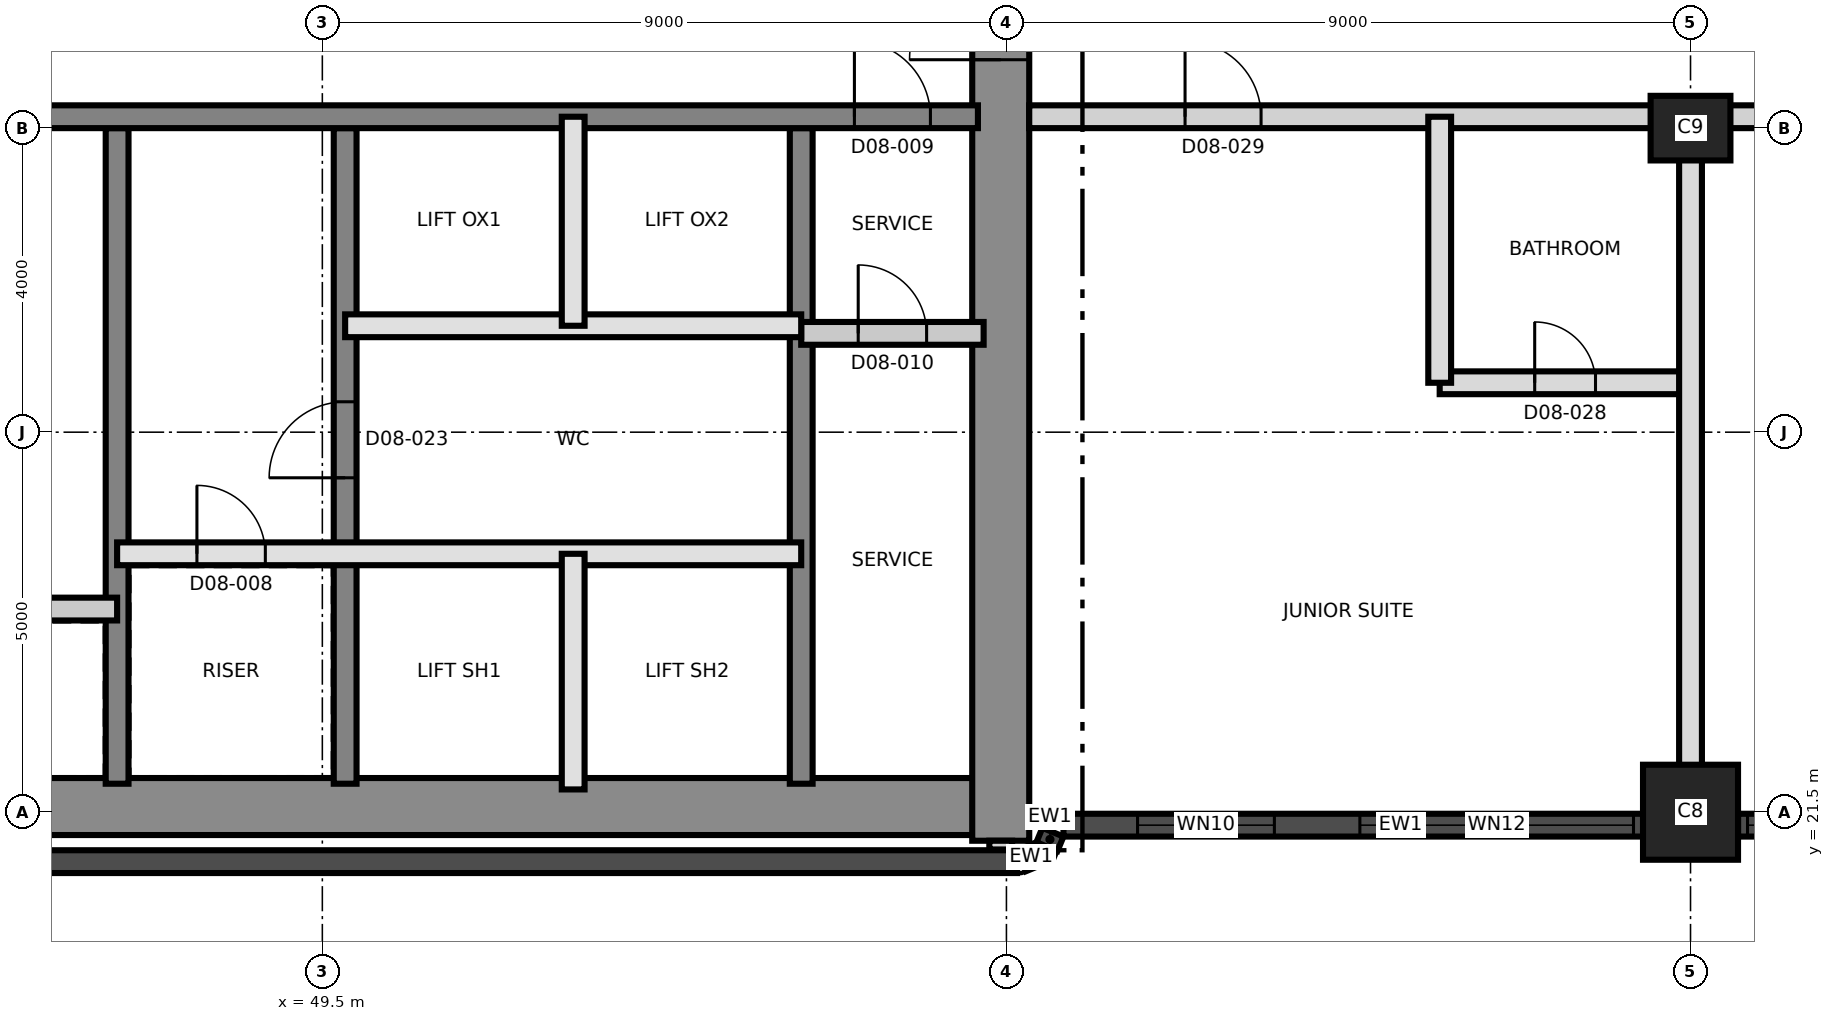
"""IFC4 building model, lengths in metres.
Left out: names, types, materials, properties, quantities, classifications, styles, units other than length and angle.
Written with IfcOpenShell. Run it as: python <this file> out.ifc"""

import sys

from ifc_helpers import new_model, si_unit, direction, frame, frame_2d, origin, origin_2d, place, context, subcontext, project, spatial, rectangle, extrude, element, fill, save


model = new_model("IFC4")
c1 = context("Model", 3, precision=1e-05, world=origin(), true_north=direction((0.0, 1.0)))
c2 = subcontext(c1, "Body", "Model", "MODEL_VIEW")
j1 = project(units=[si_unit("LENGTHUNIT", "METRE"), si_unit("PLANEANGLEUNIT", "RADIAN")], contexts=[c1])
p1 = place(None, origin())
s1 = spatial("IfcSite", under=j1, at=p1, CompositionType="ELEMENT")
p2 = place(p1, origin())
s2 = spatial("IfcBuilding", under=s1, at=p2, CompositionType="ELEMENT")
p3 = place(p2, frame((0.0, 0.0, 101.9)))
s3 = spatial("IfcBuildingStorey", under=s2, at=p3, CompositionType="ELEMENT", Elevation=101.9)
p4 = place(p3, frame((31.125, 21.575, 0.0), z_axis=(0.0, 0.0, 1.0), x_axis=(1.0, 0.0, 0.0)))
e1 = element("IfcWall", 1, at=p4, inside=s3, PredefinedType="SHEAR", context=c2, shape_type="SweptSolid", body=[
    extrude(rectangle(XDim=27.0, YDim=0.75, at=frame_2d((13.5, 0.0))), origin(), (0.0, 0.0, 1.0), 3.7),
])
p5 = place(p3, frame((58.425, 21.125, 0.0), z_axis=(0.0, 0.0, 1.0), x_axis=(0.0, 1.0, 0.0)))
e2 = element("IfcWall", 2, at=p5, inside=s3, PredefinedType="SHEAR", context=c2, shape_type="SweptSolid", body=[
    extrude(rectangle(XDim=18.75, YDim=0.75, at=frame_2d((9.375, 0.0))), origin(), (0.0, 0.0, 1.0), 3.7),
])
p6 = place(p5, frame((10.275, 0.0, 0.0)))
e3 = element("IfcOpeningElement", 3, at=p6, cuts=e2, PredefinedType="OPENING", context=c2, shape_type="SweptSolid", body=[
    extrude(rectangle(XDim=1.2, YDim=2.1, at=frame_2d((0.6, 1.05))), frame((0.0, 0.385, 0.0), z_axis=(0.0, -1.0, 0.0), x_axis=(1.0, 0.0, 0.0)), (0.0, 0.0, 1.0), 0.77),
])
p7 = place(p3, frame((46.8, 21.875, 0.0), z_axis=(0.0, 0.0, 1.0), x_axis=(0.0, 1.0, 0.0)))
e4 = element("IfcWall", 4, at=p7, inside=s3, PredefinedType="SHEAR", context=c2, shape_type="SweptSolid", body=[
    extrude(rectangle(XDim=8.625, YDim=0.3, at=frame_2d((4.312, 0.0))), origin(), (0.0, 0.0, 1.0), 3.7),
])
p8 = place(p3, frame((49.8, 21.875, 0.0), z_axis=(0.0, 0.0, 1.0), x_axis=(0.0, 1.0, 0.0)))
e5 = element("IfcWall", 5, at=p8, inside=s3, PredefinedType="SHEAR", context=c2, shape_type="SweptSolid", body=[
    extrude(rectangle(XDim=8.625, YDim=0.3, at=frame_2d((4.312, 0.0))), origin(), (0.0, 0.0, 1.0), 3.7),
])
p9 = place(p8, frame((4.025, 0.0, 0.0)))
e6 = element("IfcOpeningElement", 6, at=p9, cuts=e5, PredefinedType="OPENING", context=c2, shape_type="SweptSolid", body=[
    extrude(rectangle(XDim=1.0, YDim=2.1, at=frame_2d((0.5, 1.05))), frame((0.0, 0.16, 0.0), z_axis=(0.0, -1.0, 0.0), x_axis=(1.0, 0.0, 0.0)), (0.0, 0.0, 1.0), 0.32),
])
p10 = place(p3, frame((55.8, 21.875, 0.0), z_axis=(0.0, 0.0, 1.0), x_axis=(0.0, 1.0, 0.0)))
e7 = element("IfcWall", 7, at=p10, inside=s3, PredefinedType="SHEAR", context=c2, shape_type="SweptSolid", body=[
    extrude(rectangle(XDim=8.625, YDim=0.3, at=frame_2d((4.312, 0.0))), origin(), (0.0, 0.0, 1.0), 3.7),
])
p11 = place(p3, frame((31.875, 30.65, 0.0), z_axis=(0.0, 0.0, 1.0), x_axis=(1.0, 0.0, 0.0)))
e8 = element("IfcWall", 8, at=p11, inside=s3, PredefinedType="SHEAR", context=c2, shape_type="SweptSolid", body=[
    extrude(rectangle(XDim=26.25, YDim=0.3, at=frame_2d((13.125, 0.0))), origin(), (0.0, 0.0, 1.0), 3.7),
])
p12 = place(p11, frame((24.625, 0.0, 0.0)))
e9 = element("IfcOpeningElement", 9, at=p12, cuts=e8, PredefinedType="OPENING", context=c2, shape_type="SweptSolid", body=[
    extrude(rectangle(XDim=1.0, YDim=2.1, at=frame_2d((0.5, 1.05))), frame((0.0, 0.16, 0.0), z_axis=(0.0, -1.0, 0.0), x_axis=(1.0, 0.0, 0.0)), (0.0, 0.0, 1.0), 0.32),
])
p13 = place(p11, frame((11.425, 0.0, 0.0)))
e10 = element("IfcOpeningElement", 10, at=p13, cuts=e8, PredefinedType="OPENING", context=c2, shape_type="SweptSolid", body=[
    extrude(rectangle(XDim=1.0, YDim=2.1, at=frame_2d((0.5, 1.05))), frame((0.0, 0.16, 0.0), z_axis=(0.0, -1.0, 0.0), x_axis=(1.0, 0.0, 0.0)), (0.0, 0.0, 1.0), 0.32),
])
p14 = place(p3, frame((67.5, 21.5, 0.0), z_axis=(0.0, 0.0, 1.0), x_axis=(1.0, 0.0, 0.0)))
e11 = element("IfcColumn", 11, at=p14, inside=s3, PredefinedType="COLUMN", context=c2, shape_type="SweptSolid", body=[
    extrude(rectangle(XDim=1.25, YDim=1.25, at=origin_2d()), origin(), (0.0, 0.0, 1.0), 3.7),
])
p15 = place(p3, frame((67.5, 30.5, 0.0), z_axis=(0.0, 0.0, 1.0), x_axis=(1.0, 0.0, 0.0)))
e12 = element("IfcColumn", 12, at=p15, inside=s3, PredefinedType="COLUMN", context=c2, shape_type="SweptSolid", body=[
    extrude(rectangle(XDim=1.05, YDim=0.85, at=origin_2d()), origin(), (0.0, 0.0, 1.0), 3.7),
])
p16 = place(p3, frame((31.36, 20.85, 0.0), z_axis=(0.0, 0.0, 1.0), x_axis=(1.0, 0.0, 0.0)))
e13 = element("IfcWall", 13, at=p16, inside=s3, PredefinedType="SOLIDWALL", context=c2, shape_type="SweptSolid", body=[
    extrude(rectangle(XDim=27.281, YDim=0.3, at=frame_2d((13.64, 0.0))), origin(), (0.0, 0.0, 1.0), 3.4),
])
p17 = place(p3, frame((58.698, 20.861, 0.0), z_axis=(0.0, 0.0, 1.0), x_axis=(0.923757413239, 0.38297812142, 0.0)))
e14 = element("IfcWall", 14, at=p17, inside=s3, PredefinedType="SOLIDWALL", context=c2, shape_type="SweptSolid", body=[
    extrude(rectangle(XDim=0.275, YDim=0.3, at=frame_2d((0.138, 0.0))), origin(), (0.0, 0.0, 1.0), 3.4),
])
p18 = place(p3, frame((59.033, 21.048, 0.0), z_axis=(0.0, 0.0, 1.0), x_axis=(0.383262727373, 0.923639367831, 0.0)))
e15 = element("IfcWall", 15, at=p18, inside=s3, PredefinedType="SOLIDWALL", context=c2, shape_type="SweptSolid", body=[
    extrude(rectangle(XDim=0.205, YDim=0.3, at=frame_2d((0.103, 0.0))), origin(), (0.0, 0.0, 1.0), 3.4),
])
p19 = place(p3, frame((59.25, 21.33, 0.0), z_axis=(0.0, 0.0, 1.0), x_axis=(1.0, 0.0, 0.0)))
e16 = element("IfcWall", 16, at=p19, inside=s3, PredefinedType="SOLIDWALL", context=c2, shape_type="SweptSolid", body=[
    extrude(rectangle(XDim=8.875, YDim=0.3, at=frame_2d((4.438, 0.0))), origin(), (0.0, 0.0, 1.0), 3.4),
])
p20 = place(p19, frame((0.975, 0.0, 0.3)))
e17 = element("IfcOpeningElement", 17, at=p20, cuts=e16, PredefinedType="OPENING", context=c2, shape_type="SweptSolid", body=[
    extrude(rectangle(XDim=1.8, YDim=2.4, at=frame_2d((0.9, 1.2))), frame((0.0, 0.16, 0.0), z_axis=(0.0, -1.0, 0.0), x_axis=(1.0, 0.0, 0.0)), (0.0, 0.0, 1.0), 0.32),
])
p21 = place(p19, frame((3.9, 0.0, 0.9)))
e18 = element("IfcOpeningElement", 18, at=p21, cuts=e16, PredefinedType="OPENING", context=c2, shape_type="SweptSolid", body=[
    extrude(rectangle(XDim=3.6, YDim=1.5, at=frame_2d((1.8, 0.75))), frame((0.0, 0.16, 0.0), z_axis=(0.0, -1.0, 0.0), x_axis=(1.0, 0.0, 0.0)), (0.0, 0.0, 1.0), 0.32),
])
p22 = place(p3, frame((68.125, 21.33, 0.0), z_axis=(0.0, 0.0, 1.0), x_axis=(1.0, 0.0, 0.0)))
e19 = element("IfcWall", 19, at=p22, inside=s3, PredefinedType="SOLIDWALL", context=c2, shape_type="SweptSolid", body=[
    extrude(rectangle(XDim=7.75, YDim=0.3, at=frame_2d((3.875, 0.0))), origin(), (0.0, 0.0, 1.0), 2.75),
])
p23 = place(p22, frame((0.125, 0.0, 0.9)))
e20 = element("IfcOpeningElement", 20, at=p23, cuts=e19, PredefinedType="OPENING", context=c2, shape_type="SweptSolid", body=[
    extrude(rectangle(XDim=3.6, YDim=1.5, at=frame_2d((1.8, 0.75))), frame((0.0, 0.16, 0.0), z_axis=(0.0, -1.0, 0.0), x_axis=(1.0, 0.0, 0.0)), (0.0, 0.0, 1.0), 0.32),
])
p24 = place(p22, frame((4.025, 0.0, 0.9)))
e21 = element("IfcOpeningElement", 21, at=p24, cuts=e19, PredefinedType="OPENING", context=c2, shape_type="SweptSolid", body=[
    extrude(rectangle(XDim=3.6, YDim=1.5, at=frame_2d((1.8, 0.75))), frame((0.0, 0.16, 0.0), z_axis=(0.0, -1.0, 0.0), x_axis=(1.0, 0.0, 0.0)), (0.0, 0.0, 1.0), 0.32),
])
p25 = place(p3, frame((40.8, 24.173, 0.0), z_axis=(0.0, 0.0, 1.0), x_axis=(1.0, 0.0, 0.0)))
e22 = element("IfcWall", 22, at=p25, inside=s3, PredefinedType="PARTITIONING", context=c2, shape_type="SweptSolid", body=[
    extrude(rectangle(XDim=6.0, YDim=0.3, at=frame_2d((3.0, 0.0))), origin(), (0.0, 0.0, 1.0), 3.4),
])
p26 = place(p25, frame((2.5, 0.0, 0.0)))
e23 = element("IfcOpeningElement", 23, at=p26, cuts=e22, PredefinedType="OPENING", context=c2, shape_type="SweptSolid", body=[
    extrude(rectangle(XDim=1.0, YDim=2.1, at=frame_2d((0.5, 1.05))), frame((0.0, 0.16, 0.0), z_axis=(0.0, -1.0, 0.0), x_axis=(1.0, 0.0, 0.0)), (0.0, 0.0, 1.0), 0.32),
])
p27 = place(p3, frame((46.8, 24.9, 0.0), z_axis=(0.0, 0.0, 1.0), x_axis=(1.0, 0.0, 0.0)))
e24 = element("IfcWall", 24, at=p27, inside=s3, PredefinedType="SOLIDWALL", context=c2, shape_type="SweptSolid", body=[
    extrude(rectangle(XDim=9.0, YDim=0.3, at=frame_2d((4.5, 0.0))), origin(), (0.0, 0.0, 1.0), 3.4),
])
p28 = place(p27, frame((1.05, 0.0, 0.0)))
e25 = element("IfcOpeningElement", 25, at=p28, cuts=e24, PredefinedType="OPENING", context=c2, shape_type="SweptSolid", body=[
    extrude(rectangle(XDim=0.9, YDim=2.1, at=frame_2d((0.45, 1.05))), frame((0.0, 0.16, 0.0), z_axis=(0.0, -1.0, 0.0), x_axis=(1.0, 0.0, 0.0)), (0.0, 0.0, 1.0), 0.32),
])
p29 = place(p3, frame((55.8, 27.8, 0.0), z_axis=(0.0, 0.0, 1.0), x_axis=(1.0, 0.0, 0.0)))
e26 = element("IfcWall", 26, at=p29, inside=s3, PredefinedType="PARTITIONING", context=c2, shape_type="SweptSolid", body=[
    extrude(rectangle(XDim=2.4, YDim=0.3, at=frame_2d((1.2, 0.0))), origin(), (0.0, 0.0, 1.0), 3.4),
])
p30 = place(p29, frame((0.75, 0.0, 0.0)))
e27 = element("IfcOpeningElement", 27, at=p30, cuts=e26, PredefinedType="OPENING", context=c2, shape_type="SweptSolid", body=[
    extrude(rectangle(XDim=0.9, YDim=2.1, at=frame_2d((0.45, 1.05))), frame((0.0, 0.16, 0.0), z_axis=(0.0, -1.0, 0.0), x_axis=(1.0, 0.0, 0.0)), (0.0, 0.0, 1.0), 0.32),
])
p31 = place(p3, frame((49.8, 27.9, 0.0), z_axis=(0.0, 0.0, 1.0), x_axis=(1.0, 0.0, 0.0)))
e28 = element("IfcWall", 28, at=p31, inside=s3, PredefinedType="SOLIDWALL", context=c2, shape_type="SweptSolid", body=[
    extrude(rectangle(XDim=6.0, YDim=0.3, at=frame_2d((3.0, 0.0))), origin(), (0.0, 0.0, 1.0), 3.4),
])
p32 = place(p3, frame((52.8, 21.8, 0.0), z_axis=(0.0, 0.0, 1.0), x_axis=(0.0, 1.0, 0.0)))
e29 = element("IfcWall", 29, at=p32, inside=s3, PredefinedType="SOLIDWALL", context=c2, shape_type="SweptSolid", body=[
    extrude(rectangle(XDim=3.1, YDim=0.3, at=frame_2d((1.55, 0.0))), origin(), (0.0, 0.0, 1.0), 3.4),
])
p33 = place(p3, frame((52.8, 27.9, 0.0), z_axis=(0.0, 0.0, 1.0), x_axis=(0.0, 1.0, 0.0)))
e30 = element("IfcWall", 30, at=p33, inside=s3, PredefinedType="SOLIDWALL", context=c2, shape_type="SweptSolid", body=[
    extrude(rectangle(XDim=2.75, YDim=0.3, at=frame_2d((1.375, 0.0))), origin(), (0.0, 0.0, 1.0), 3.4),
])
p34 = place(p3, frame((64.2, 27.15, 0.0), z_axis=(0.0, 0.0, 1.0), x_axis=(1.0, 0.0, 0.0)))
e31 = element("IfcWall", 31, at=p34, inside=s3, PredefinedType="PARTITIONING", context=c2, shape_type="SweptSolid", body=[
    extrude(rectangle(XDim=3.3, YDim=0.3, at=frame_2d((1.65, 0.0))), origin(), (0.0, 0.0, 1.0), 3.4),
])
p35 = place(p34, frame((1.25, 0.0, 0.0)))
e32 = element("IfcOpeningElement", 32, at=p35, cuts=e31, PredefinedType="OPENING", context=c2, shape_type="SweptSolid", body=[
    extrude(rectangle(XDim=0.8, YDim=2.1, at=frame_2d((0.4, 1.05))), frame((0.0, 0.16, 0.0), z_axis=(0.0, -1.0, 0.0), x_axis=(1.0, 0.0, 0.0)), (0.0, 0.0, 1.0), 0.32),
])
p36 = place(p3, frame((58.8, 30.65, 0.0), z_axis=(0.0, 0.0, 1.0), x_axis=(1.0, 0.0, 0.0)))
e33 = element("IfcWall", 33, at=p36, inside=s3, PredefinedType="PARTITIONING", context=c2, shape_type="SweptSolid", body=[
    extrude(rectangle(XDim=26.53, YDim=0.3, at=frame_2d((13.265, 0.0))), origin(), (0.0, 0.0, 1.0), 3.4),
])
p37 = place(p36, frame((2.05, 0.0, 0.0)))
e34 = element("IfcOpeningElement", 34, at=p37, cuts=e33, PredefinedType="OPENING", context=c2, shape_type="SweptSolid", body=[
    extrude(rectangle(XDim=1.0, YDim=2.4, at=frame_2d((0.5, 1.2))), frame((0.0, 0.16, 0.0), z_axis=(0.0, -1.0, 0.0), x_axis=(1.0, 0.0, 0.0)), (0.0, 0.0, 1.0), 0.32),
])
p38 = place(p36, frame((9.85, 0.0, 0.0)))
e35 = element("IfcOpeningElement", 35, at=p38, cuts=e33, PredefinedType="OPENING", context=c2, shape_type="SweptSolid", body=[
    extrude(rectangle(XDim=1.0, YDim=2.1, at=frame_2d((0.5, 1.05))), frame((0.0, 0.16, 0.0), z_axis=(0.0, -1.0, 0.0), x_axis=(1.0, 0.0, 0.0)), (0.0, 0.0, 1.0), 0.32),
])
p39 = place(p36, frame((15.7, 0.0, 0.0)))
e36 = element("IfcOpeningElement", 36, at=p39, cuts=e33, PredefinedType="OPENING", context=c2, shape_type="SweptSolid", body=[
    extrude(rectangle(XDim=1.0, YDim=2.1, at=frame_2d((0.5, 1.05))), frame((0.0, 0.16, 0.0), z_axis=(0.0, -1.0, 0.0), x_axis=(1.0, 0.0, 0.0)), (0.0, 0.0, 1.0), 0.32),
])
p40 = place(p36, frame((18.835, 0.0, 0.0)))
e37 = element("IfcOpeningElement", 37, at=p40, cuts=e33, PredefinedType="OPENING", context=c2, shape_type="SweptSolid", body=[
    extrude(rectangle(XDim=1.2, YDim=2.1, at=frame_2d((0.6, 1.05))), frame((0.0, 0.16, 0.0), z_axis=(0.0, -1.0, 0.0), x_axis=(1.0, 0.0, 0.0)), (0.0, 0.0, 1.0), 0.32),
])
p41 = place(p36, frame((22.085, 0.0, 0.0)))
e38 = element("IfcOpeningElement", 38, at=p41, cuts=e33, PredefinedType="OPENING", context=c2, shape_type="SweptSolid", body=[
    extrude(rectangle(XDim=1.0, YDim=2.1, at=frame_2d((0.5, 1.05))), frame((0.0, 0.16, 0.0), z_axis=(0.0, -1.0, 0.0), x_axis=(1.0, 0.0, 0.0)), (0.0, 0.0, 1.0), 0.32),
])
p42 = place(p3, frame((64.2, 27.15, 0.0), z_axis=(0.0, 0.0, 1.0), x_axis=(0.0, 1.0, 0.0)))
e39 = element("IfcWall", 39, at=p42, inside=s3, PredefinedType="PARTITIONING", context=c2, shape_type="SweptSolid", body=[
    extrude(rectangle(XDim=3.5, YDim=0.3, at=frame_2d((1.75, 0.0))), origin(), (0.0, 0.0, 1.0), 3.4),
])
p43 = place(p3, frame((67.5, 21.53, 0.0), z_axis=(0.0, 0.0, 1.0), x_axis=(0.0, 1.0, 0.0)))
e40 = element("IfcWall", 40, at=p43, inside=s3, PredefinedType="PARTITIONING", context=c2, shape_type="SweptSolid", body=[
    extrude(rectangle(XDim=9.12, YDim=0.3, at=frame_2d((4.56, 0.0))), origin(), (0.0, 0.0, 1.0), 3.4),
])
p44 = place(p3, frame((58.425, 21.125, 0.0), z_axis=(0.0, 0.0, 1.0), x_axis=(0.0, -1.0, 0.0)))
e41 = element("IfcWall", 41, at=p44, inside=s3, PredefinedType="PARTITIONING", context=c2, shape_type="SweptSolid", body=[
    extrude(rectangle(XDim=0.115, YDim=0.3, at=frame_2d((0.058, 0.0))), origin(), (0.0, 0.0, 1.0), 3.4),
])
p45 = place(p20, origin())
e42 = element("IfcWindow", 42, at=p45, inside=s3, PartitioningType="SINGLE_PANEL", PredefinedType="WINDOW", context=c2, shape_type="SweptSolid", body=[
    extrude(rectangle(XDim=1.8, YDim=2.4, at=frame_2d((0.9, 1.2))), frame((0.0, 0.03, 0.0), z_axis=(0.0, -1.0, 0.0), x_axis=(1.0, 0.0, 0.0)), (0.0, 0.0, 1.0), 0.06),
])
fill(e17, e42)
p46 = place(p21, origin())
e43 = element("IfcWindow", 43, at=p46, inside=s3, PartitioningType="SINGLE_PANEL", PredefinedType="WINDOW", context=c2, shape_type="SweptSolid", body=[
    extrude(rectangle(XDim=3.6, YDim=1.5, at=frame_2d((1.8, 0.75))), frame((0.0, 0.03, 0.0), z_axis=(0.0, -1.0, 0.0), x_axis=(1.0, 0.0, 0.0)), (0.0, 0.0, 1.0), 0.06),
])
fill(e18, e43)
p47 = place(p23, origin())
e44 = element("IfcWindow", 44, at=p47, inside=s3, PartitioningType="SINGLE_PANEL", PredefinedType="WINDOW", context=c2, shape_type="SweptSolid", body=[
    extrude(rectangle(XDim=3.6, YDim=1.5, at=frame_2d((1.8, 0.75))), frame((0.0, 0.03, 0.0), z_axis=(0.0, -1.0, 0.0), x_axis=(1.0, 0.0, 0.0)), (0.0, 0.0, 1.0), 0.06),
])
fill(e20, e44)
p48 = place(p28, origin())
e45 = element("IfcDoor", 45, at=p48, inside=s3, OperationType="SINGLE_SWING_RIGHT", PredefinedType="DOOR", context=c2, shape_type="SweptSolid", body=[
    extrude(rectangle(XDim=0.9, YDim=2.1, at=frame_2d((0.45, 1.05))), frame((0.0, 0.025, 0.0), z_axis=(0.0, -1.0, 0.0), x_axis=(1.0, 0.0, 0.0)), (0.0, 0.0, 1.0), 0.05),
])
fill(e25, e45)
p49 = place(p12, origin())
e46 = element("IfcDoor", 46, at=p49, inside=s3, OperationType="SINGLE_SWING_LEFT", PredefinedType="DOOR", context=c2, shape_type="SweptSolid", body=[
    extrude(rectangle(XDim=1.0, YDim=2.1, at=frame_2d((0.5, 1.05))), frame((0.0, 0.025, 0.0), z_axis=(0.0, -1.0, 0.0), x_axis=(1.0, 0.0, 0.0)), (0.0, 0.0, 1.0), 0.05),
])
fill(e9, e46)
p50 = place(p30, origin())
e47 = element("IfcDoor", 47, at=p50, inside=s3, OperationType="SINGLE_SWING_RIGHT", PredefinedType="DOOR", context=c2, shape_type="SweptSolid", body=[
    extrude(rectangle(XDim=0.9, YDim=2.1, at=frame_2d((0.45, 1.05))), frame((0.0, 0.025, 0.0), z_axis=(0.0, -1.0, 0.0), x_axis=(1.0, 0.0, 0.0)), (0.0, 0.0, 1.0), 0.05),
])
fill(e27, e47)
p51 = place(p6, origin())
e48 = element("IfcDoor", 48, at=p51, inside=s3, OperationType="SINGLE_SWING_LEFT", PredefinedType="DOOR", context=c2, shape_type="SweptSolid", body=[
    extrude(rectangle(XDim=1.2, YDim=2.1, at=frame_2d((0.6, 1.05))), frame((0.0, 0.025, 0.0), z_axis=(0.0, -1.0, 0.0), x_axis=(1.0, 0.0, 0.0)), (0.0, 0.0, 1.0), 0.05),
])
fill(e3, e48)
p52 = place(p9, origin())
e49 = element("IfcDoor", 49, at=p52, inside=s3, OperationType="SINGLE_SWING_LEFT", PredefinedType="DOOR", context=c2, shape_type="SweptSolid", body=[
    extrude(rectangle(XDim=1.0, YDim=2.1, at=frame_2d((0.5, 1.05))), frame((0.0, 0.025, 0.0), z_axis=(0.0, -1.0, 0.0), x_axis=(1.0, 0.0, 0.0)), (0.0, 0.0, 1.0), 0.05),
])
fill(e6, e49)
p53 = place(p35, origin())
e50 = element("IfcDoor", 50, at=p53, inside=s3, OperationType="SINGLE_SWING_LEFT", PredefinedType="DOOR", context=c2, shape_type="SweptSolid", body=[
    extrude(rectangle(XDim=0.8, YDim=2.1, at=frame_2d((0.4, 1.05))), frame((0.0, 0.025, 0.0), z_axis=(0.0, -1.0, 0.0), x_axis=(1.0, 0.0, 0.0)), (0.0, 0.0, 1.0), 0.05),
])
fill(e32, e50)
p54 = place(p37, origin())
e51 = element("IfcDoor", 51, at=p54, inside=s3, OperationType="SINGLE_SWING_LEFT", PredefinedType="DOOR", context=c2, shape_type="SweptSolid", body=[
    extrude(rectangle(XDim=1.0, YDim=2.4, at=frame_2d((0.5, 1.2))), frame((0.0, 0.025, 0.0), z_axis=(0.0, -1.0, 0.0), x_axis=(1.0, 0.0, 0.0)), (0.0, 0.0, 1.0), 0.05),
])
fill(e34, e51)
save(model, sys.argv[1])
